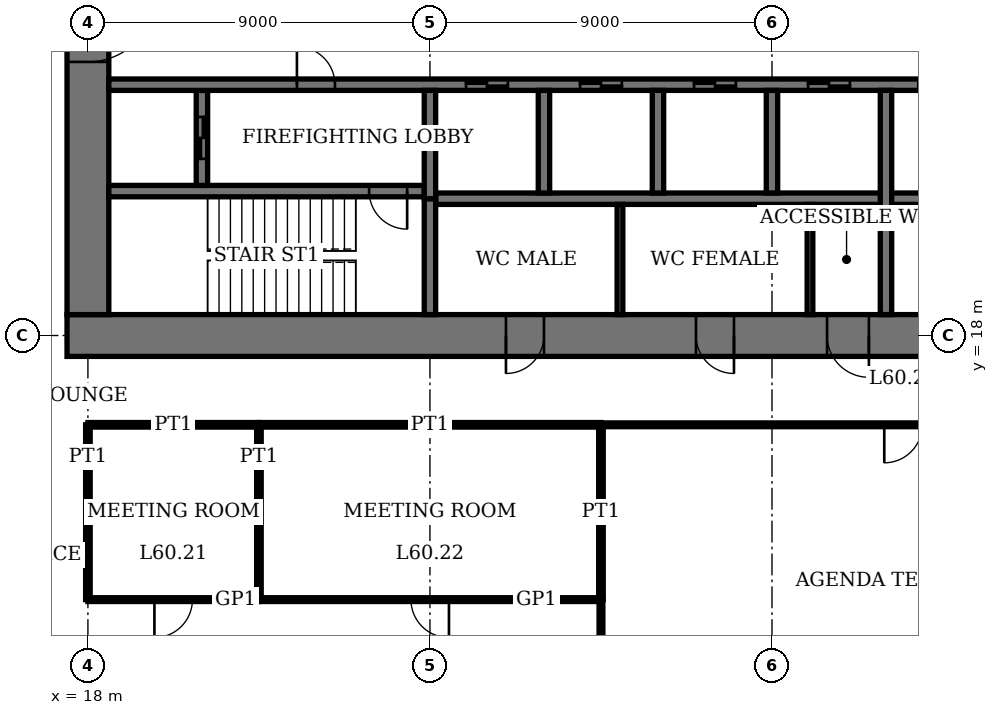
"""IFC4 building model, lengths in metres.
Left out: names, types, materials, properties, quantities, classifications, styles, units other than length and angle.
Written with IfcOpenShell. Run it as: python <this file> out.ifc"""

import sys

from ifc_helpers import new_model, si_unit, direction, frame, frame_2d, origin, place, context, subcontext, project, spatial, rectangle, extrude, element, fill, save


model = new_model("IFC4")
c1 = context("Model", 3, precision=1e-05, world=origin(), true_north=direction((0.0, 1.0)))
c2 = subcontext(c1, "Body", "Model", "MODEL_VIEW")
j1 = project(units=[si_unit("LENGTHUNIT", "METRE"), si_unit("PLANEANGLEUNIT", "RADIAN")], contexts=[c1])
p1 = place(None, origin())
s1 = spatial("IfcSite", under=j1, at=p1, CompositionType="ELEMENT")
p2 = place(p1, origin())
s2 = spatial("IfcBuilding", under=s1, at=p2, CompositionType="ELEMENT")
p3 = place(p2, frame((0.0, 0.0, 247.4)))
s3 = spatial("IfcBuildingStorey", under=s2, at=p3, CompositionType="ELEMENT", Elevation=247.4)
p4 = place(p3, frame((17.45, 18.0, 0.0), z_axis=(0.0, 0.0, 1.0), x_axis=(1.0, 0.0, 0.0)))
e1 = element("IfcWall", 1, at=p4, inside=s3, PredefinedType="SHEAR", context=c2, shape_type="SweptSolid", body=[
    extrude(rectangle(XDim=28.1, YDim=1.1, at=frame_2d((14.05, 0.0))), origin(), (0.0, 0.0, 1.0), 4.0),
])
p5 = place(p4, frame((11.55, 0.0, 0.0)))
e2 = element("IfcOpeningElement", 2, at=p5, cuts=e1, PredefinedType="OPENING", context=c2, shape_type="SweptSolid", body=[
    extrude(rectangle(XDim=1.0, YDim=2.4, at=frame_2d((0.5, 1.2))), frame((0.0, 0.56, 0.0), z_axis=(0.0, -1.0, 0.0), x_axis=(1.0, 0.0, 0.0)), (0.0, 0.0, 1.0), 1.12),
])
p6 = place(p4, frame((16.55, 0.0, 0.0)))
e3 = element("IfcOpeningElement", 3, at=p6, cuts=e1, PredefinedType="OPENING", context=c2, shape_type="SweptSolid", body=[
    extrude(rectangle(XDim=1.0, YDim=2.4, at=frame_2d((0.5, 1.2))), frame((0.0, 0.56, 0.0), z_axis=(0.0, -1.0, 0.0), x_axis=(1.0, 0.0, 0.0)), (0.0, 0.0, 1.0), 1.12),
])
p7 = place(p4, frame((20.0, 0.0, 0.0)))
e4 = element("IfcOpeningElement", 4, at=p7, cuts=e1, PredefinedType="OPENING", context=c2, shape_type="SweptSolid", body=[
    extrude(rectangle(XDim=1.1, YDim=2.4, at=frame_2d((0.55, 1.2))), frame((0.0, 0.56, 0.0), z_axis=(0.0, -1.0, 0.0), x_axis=(1.0, 0.0, 0.0)), (0.0, 0.0, 1.0), 1.12),
])
p8 = place(p4, frame((24.05, 0.0, 0.0)))
e5 = element("IfcOpeningElement", 5, at=p8, cuts=e1, PredefinedType="OPENING", context=c2, shape_type="SweptSolid", body=[
    extrude(rectangle(XDim=1.0, YDim=2.4, at=frame_2d((0.5, 1.2))), frame((0.0, 0.56, 0.0), z_axis=(0.0, -1.0, 0.0), x_axis=(1.0, 0.0, 0.0)), (0.0, 0.0, 1.0), 1.12),
])
p9 = place(p3, frame((18.0, 35.45, 0.0), z_axis=(0.0, 0.0, 1.0), x_axis=(0.0, -1.0, 0.0)))
e6 = element("IfcWall", 6, at=p9, inside=s3, PredefinedType="SHEAR", context=c2, shape_type="SweptSolid", body=[
    extrude(rectangle(XDim=16.9, YDim=1.1, at=frame_2d((8.45, 0.0))), origin(), (0.0, 0.0, 1.0), 4.0),
])
p10 = place(p9, frame((8.45, 0.0, 0.0)))
e7 = element("IfcOpeningElement", 7, at=p10, cuts=e6, PredefinedType="OPENING", context=c2, shape_type="SweptSolid", body=[
    extrude(rectangle(XDim=1.8, YDim=2.4, at=frame_2d((0.9, 1.2))), frame((0.0, 0.56, 0.0), z_axis=(0.0, -1.0, 0.0), x_axis=(1.0, 0.0, 0.0)), (0.0, 0.0, 1.0), 1.12),
])
p11 = place(p3, frame((18.55, 21.8, 0.0), z_axis=(0.0, 0.0, 1.0), x_axis=(1.0, 0.0, 0.0)))
e8 = element("IfcWall", 8, at=p11, inside=s3, PredefinedType="SHEAR", context=c2, shape_type="SweptSolid", body=[
    extrude(rectangle(XDim=8.3, YDim=0.3, at=frame_2d((4.15, 0.0))), origin(), (0.0, 0.0, 1.0), 4.0),
])
p12 = place(p11, frame((6.85, 0.0, 0.0)))
e9 = element("IfcOpeningElement", 9, at=p12, cuts=e8, PredefinedType="OPENING", context=c2, shape_type="SweptSolid", body=[
    extrude(rectangle(XDim=1.0, YDim=2.4, at=frame_2d((0.5, 1.2))), frame((0.0, 0.16, 0.0), z_axis=(0.0, -1.0, 0.0), x_axis=(1.0, 0.0, 0.0)), (0.0, 0.0, 1.0), 0.32),
])
p13 = place(p3, frame((27.0, 18.55, 0.0), z_axis=(0.0, 0.0, 1.0), x_axis=(0.0, 1.0, 0.0)))
e10 = element("IfcWall", 10, at=p13, inside=s3, PredefinedType="SHEAR", context=c2, shape_type="SweptSolid", body=[
    extrude(rectangle(XDim=3.05, YDim=0.3, at=frame_2d((1.525, 0.0))), origin(), (0.0, 0.0, 1.0), 4.0),
])
p14 = place(p3, frame((21.0, 21.95, 0.0), z_axis=(0.0, 0.0, 1.0), x_axis=(0.0, 1.0, 0.0)))
e11 = element("IfcWall", 11, at=p14, inside=s3, PredefinedType="SHEAR", context=c2, shape_type="SweptSolid", body=[
    extrude(rectangle(XDim=2.5, YDim=0.3, at=frame_2d((1.25, 0.0))), origin(), (0.0, 0.0, 1.0), 4.0),
])
p15 = place(p14, frame((0.7, 0.0, 0.0)))
e12 = element("IfcOpeningElement", 12, at=p15, cuts=e11, PredefinedType="OPENING", context=c2, shape_type="SweptSolid", body=[
    extrude(rectangle(XDim=1.1, YDim=2.4, at=frame_2d((0.55, 1.2))), frame((0.0, 0.16, 0.0), z_axis=(0.0, -1.0, 0.0), x_axis=(1.0, 0.0, 0.0)), (0.0, 0.0, 1.0), 0.32),
])
p16 = place(p3, frame((18.55, 24.6, 0.0), z_axis=(0.0, 0.0, 1.0), x_axis=(1.0, 0.0, 0.0)))
e13 = element("IfcWall", 13, at=p16, inside=s3, PredefinedType="SHEAR", context=c2, shape_type="SweptSolid", body=[
    extrude(rectangle(XDim=25.9, YDim=0.3, at=frame_2d((12.95, 0.0))), origin(), (0.0, 0.0, 1.0), 4.0),
])
p17 = place(p16, frame((4.95, 0.0, 0.0)))
e14 = element("IfcOpeningElement", 14, at=p17, cuts=e13, PredefinedType="OPENING", context=c2, shape_type="SweptSolid", body=[
    extrude(rectangle(XDim=1.0, YDim=2.4, at=frame_2d((0.5, 1.2))), frame((0.0, 0.16, 0.0), z_axis=(0.0, -1.0, 0.0), x_axis=(1.0, 0.0, 0.0)), (0.0, 0.0, 1.0), 0.32),
])
p18 = place(p16, frame((24.5, 0.0, 0.0)))
e15 = element("IfcOpeningElement", 15, at=p18, cuts=e13, PredefinedType="OPENING", context=c2, shape_type="SweptSolid", body=[
    extrude(rectangle(XDim=0.9, YDim=2.1, at=frame_2d((0.45, 1.05))), frame((0.0, 0.16, 0.0), z_axis=(0.0, -1.0, 0.0), x_axis=(1.0, 0.0, 0.0)), (0.0, 0.0, 1.0), 0.32),
])
p19 = place(p16, frame((9.4, 0.0, 0.0)))
e16 = element("IfcOpeningElement", 16, at=p19, cuts=e13, PredefinedType="OPENING", context=c2, shape_type="SweptSolid", body=[
    extrude(rectangle(XDim=1.1, YDim=2.4, at=frame_2d((0.55, 1.2))), frame((0.0, 0.16, 0.0), z_axis=(0.0, -1.0, 0.0), x_axis=(1.0, 0.0, 0.0)), (0.0, 0.0, 1.0), 0.32),
])
p20 = place(p16, frame((12.4, 0.0, 0.0)))
e17 = element("IfcOpeningElement", 17, at=p20, cuts=e13, PredefinedType="OPENING", context=c2, shape_type="SweptSolid", body=[
    extrude(rectangle(XDim=1.1, YDim=2.4, at=frame_2d((0.55, 1.2))), frame((0.0, 0.16, 0.0), z_axis=(0.0, -1.0, 0.0), x_axis=(1.0, 0.0, 0.0)), (0.0, 0.0, 1.0), 0.32),
])
p21 = place(p16, frame((15.4, 0.0, 0.0)))
e18 = element("IfcOpeningElement", 18, at=p21, cuts=e13, PredefinedType="OPENING", context=c2, shape_type="SweptSolid", body=[
    extrude(rectangle(XDim=1.1, YDim=2.4, at=frame_2d((0.55, 1.2))), frame((0.0, 0.16, 0.0), z_axis=(0.0, -1.0, 0.0), x_axis=(1.0, 0.0, 0.0)), (0.0, 0.0, 1.0), 0.32),
])
p22 = place(p16, frame((18.4, 0.0, 0.0)))
e19 = element("IfcOpeningElement", 19, at=p22, cuts=e13, PredefinedType="OPENING", context=c2, shape_type="SweptSolid", body=[
    extrude(rectangle(XDim=1.1, YDim=2.4, at=frame_2d((0.55, 1.2))), frame((0.0, 0.16, 0.0), z_axis=(0.0, -1.0, 0.0), x_axis=(1.0, 0.0, 0.0)), (0.0, 0.0, 1.0), 0.32),
])
p23 = place(p16, frame((21.3, 0.0, 0.0)))
e20 = element("IfcOpeningElement", 20, at=p23, cuts=e13, PredefinedType="OPENING", context=c2, shape_type="SweptSolid", body=[
    extrude(rectangle(XDim=1.3, YDim=2.4, at=frame_2d((0.65, 1.2))), frame((0.0, 0.16, 0.0), z_axis=(0.0, -1.0, 0.0), x_axis=(1.0, 0.0, 0.0)), (0.0, 0.0, 1.0), 0.32),
])
p24 = place(p3, frame((27.15, 21.6, 0.0), z_axis=(0.0, 0.0, 1.0), x_axis=(1.0, 0.0, 0.0)))
e21 = element("IfcWall", 21, at=p24, inside=s3, PredefinedType="SHEAR", context=c2, shape_type="SweptSolid", body=[
    extrude(rectangle(XDim=17.3, YDim=0.3, at=frame_2d((8.65, 0.0))), origin(), (0.0, 0.0, 1.0), 4.0),
])
for number, where, z_axis, x_axis in (
    (22, (30.0, 21.75, 0.0), (0.0, 0.0, 1.0), (0.0, 1.0, 0.0)),
    (23, (33.0, 21.75, 0.0), (0.0, 0.0, 1.0), (0.0, 1.0, 0.0)),
    (24, (36.0, 21.75, 0.0), (0.0, 0.0, 1.0), (0.0, 1.0, 0.0)),
):
    element("IfcWall", number, at=place(p3, frame(where, z_axis=z_axis, x_axis=x_axis)), inside=s3, PredefinedType="SHEAR", context=c2, shape_type="SweptSolid", body=[
        extrude(rectangle(XDim=2.7, YDim=0.3, at=frame_2d((1.35, 0.0))), origin(), (0.0, 0.0, 1.0), 4.0),
    ])
p25 = place(p3, frame((39.0, 18.55, 0.0), z_axis=(0.0, 0.0, 1.0), x_axis=(0.0, 1.0, 0.0)))
e25 = element("IfcWall", 25, at=p25, inside=s3, PredefinedType="SHEAR", context=c2, shape_type="SweptSolid", body=[
    extrude(rectangle(XDim=5.9, YDim=0.3, at=frame_2d((2.95, 0.0))), origin(), (0.0, 0.0, 1.0), 4.0),
])
p26 = place(p3, frame((27.0, 21.6, 0.0), z_axis=(0.0, 0.0, 1.0), x_axis=(0.0, 1.0, 0.0)))
e26 = element("IfcWall", 26, at=p26, inside=s3, PredefinedType="SHEAR", context=c2, shape_type="SweptSolid", body=[
    extrude(rectangle(XDim=2.85, YDim=0.3, at=frame_2d((1.425, 0.0))), origin(), (0.0, 0.0, 1.0), 4.0),
])
p27 = place(p3, frame((18.0, 11.05, 0.0), z_axis=(0.0, 0.0, 1.0), x_axis=(1.0, 0.0, 0.0)))
e27 = element("IfcWall", 27, at=p27, inside=s3, PredefinedType="PARTITIONING", context=c2, shape_type="SweptSolid", body=[
    extrude(rectangle(XDim=4.5, YDim=0.1, at=frame_2d((2.25, 0.0))), origin(), (0.0, 0.0, 1.0), 3.75),
])
p28 = place(p27, frame((1.75, 0.0, 0.0)))
e28 = element("IfcOpeningElement", 28, at=p28, cuts=e27, PredefinedType="OPENING", context=c2, shape_type="SweptSolid", body=[
    extrude(rectangle(XDim=1.0, YDim=2.4, at=frame_2d((0.5, 1.2))), frame((0.0, 0.06, 0.0), z_axis=(0.0, -1.0, 0.0), x_axis=(1.0, 0.0, 0.0)), (0.0, 0.0, 1.0), 0.12),
])
p29 = place(p3, frame((22.5, 11.05, 0.0), z_axis=(0.0, 0.0, 1.0), x_axis=(1.0, 0.0, 0.0)))
e29 = element("IfcWall", 29, at=p29, inside=s3, PredefinedType="PARTITIONING", context=c2, shape_type="SweptSolid", body=[
    extrude(rectangle(XDim=9.0, YDim=0.1, at=frame_2d((4.5, 0.0))), origin(), (0.0, 0.0, 1.0), 3.75),
])
p30 = place(p29, frame((4.0, 0.0, 0.0)))
e30 = element("IfcOpeningElement", 30, at=p30, cuts=e29, PredefinedType="OPENING", context=c2, shape_type="SweptSolid", body=[
    extrude(rectangle(XDim=1.0, YDim=2.4, at=frame_2d((0.5, 1.2))), frame((0.0, 0.06, 0.0), z_axis=(0.0, -1.0, 0.0), x_axis=(1.0, 0.0, 0.0)), (0.0, 0.0, 1.0), 0.12),
])
p31 = place(p3, frame((18.0, 15.65, 0.0), z_axis=(0.0, 0.0, 1.0), x_axis=(1.0, 0.0, 0.0)))
e31 = element("IfcWall", 31, at=p31, inside=s3, PredefinedType="PARTITIONING", context=c2, shape_type="SweptSolid", body=[
    extrude(rectangle(XDim=4.5, YDim=0.12, at=frame_2d((2.25, 0.0))), origin(), (0.0, 0.0, 1.0), 3.75),
])
p32 = place(p3, frame((22.5, 15.65, 0.0), z_axis=(0.0, 0.0, 1.0), x_axis=(1.0, 0.0, 0.0)))
e32 = element("IfcWall", 32, at=p32, inside=s3, PredefinedType="PARTITIONING", context=c2, shape_type="SweptSolid", body=[
    extrude(rectangle(XDim=9.0, YDim=0.12, at=frame_2d((4.5, 0.0))), origin(), (0.0, 0.0, 1.0), 3.75),
])
p33 = place(p3, frame((31.51, 15.65, 0.0), z_axis=(0.0, 0.0, 1.0), x_axis=(1.0, 0.0, 0.0)))
e33 = element("IfcWall", 33, at=p33, inside=s3, PredefinedType="PARTITIONING", context=c2, shape_type="SweptSolid", body=[
    extrude(rectangle(XDim=15.89, YDim=0.1, at=frame_2d((7.945, 0.0))), origin(), (0.0, 0.0, 1.0), 3.75),
])
p34 = place(p33, frame((7.445, 0.0, 0.0)))
e34 = element("IfcOpeningElement", 34, at=p34, cuts=e33, PredefinedType="OPENING", context=c2, shape_type="SweptSolid", body=[
    extrude(rectangle(XDim=1.0, YDim=2.4, at=frame_2d((0.5, 1.2))), frame((0.0, 0.06, 0.0), z_axis=(0.0, -1.0, 0.0), x_axis=(1.0, 0.0, 0.0)), (0.0, 0.0, 1.0), 0.12),
])
p35 = place(p3, frame((18.0, 11.05, 0.0), z_axis=(0.0, 0.0, 1.0), x_axis=(0.0, 1.0, 0.0)))
e35 = element("IfcWall", 35, at=p35, inside=s3, PredefinedType="PARTITIONING", context=c2, shape_type="SweptSolid", body=[
    extrude(rectangle(XDim=4.6, YDim=0.12, at=frame_2d((2.3, 0.0))), origin(), (0.0, 0.0, 1.0), 3.05),
])
for number, where, z_axis, x_axis in (
    (36, (22.5, 11.05, 0.0), (0.0, 0.0, 1.0), (0.0, 1.0, 0.0)),
    (37, (31.5, 11.05, 0.0), (0.0, 0.0, 1.0), (0.0, 1.0, 0.0)),
):
    element("IfcWall", number, at=place(p3, frame(where, z_axis=z_axis, x_axis=x_axis)), inside=s3, PredefinedType="PARTITIONING", context=c2, shape_type="SweptSolid", body=[
        extrude(rectangle(XDim=4.6, YDim=0.12, at=frame_2d((2.3, 0.0))), origin(), (0.0, 0.0, 1.0), 3.75),
    ])
p36 = place(p3, frame((31.5, 7.19, 0.0), z_axis=(0.0, 0.0, 1.0), x_axis=(0.0, 1.0, 0.0)))
e38 = element("IfcWall", 38, at=p36, inside=s3, PredefinedType="PARTITIONING", context=c2, shape_type="SweptSolid", body=[
    extrude(rectangle(XDim=3.86, YDim=0.1, at=frame_2d((1.93, 0.0))), origin(), (0.0, 0.0, 1.0), 3.75),
])
for number, where, z_axis, x_axis in (
    (39, (32.0, 18.55, 0.0), (0.0, 0.0, 1.0), (0.0, 1.0, 0.0)),
    (40, (37.0, 18.55, 0.0), (0.0, 0.0, 1.0), (0.0, 1.0, 0.0)),
):
    element("IfcWall", number, at=place(p3, frame(where, z_axis=z_axis, x_axis=x_axis)), inside=s3, PredefinedType="PARTITIONING", context=c2, shape_type="SweptSolid", body=[
        extrude(rectangle(XDim=2.9, YDim=0.15, at=frame_2d((1.45, 0.0))), origin(), (0.0, 0.0, 1.0), 3.75),
    ])
p37 = place(p10, origin())
e41 = element("IfcDoor", 41, at=p37, inside=s3, OperationType="DOUBLE_DOOR_DOUBLE_SWING", PredefinedType="DOOR", context=c2, shape_type="SweptSolid", body=[
    extrude(rectangle(XDim=1.8, YDim=2.4, at=frame_2d((0.9, 1.2))), frame((0.0, 0.03, 0.0), z_axis=(0.0, -1.0, 0.0), x_axis=(1.0, 0.0, 0.0)), (0.0, 0.0, 1.0), 0.06),
    extrude(rectangle(XDim=0.04, YDim=2.4, at=frame_2d((0.02, 1.2))), frame((0.0, 0.55, 0.0), z_axis=(0.0, -1.0, 0.0), x_axis=(1.0, 0.0, 0.0)), (0.0, 0.0, 1.0), 1.1),
    extrude(rectangle(XDim=0.04, YDim=2.4, at=frame_2d((1.78, 1.2))), frame((0.0, 0.55, 0.0), z_axis=(0.0, -1.0, 0.0), x_axis=(1.0, 0.0, 0.0)), (0.0, 0.0, 1.0), 1.1),
    extrude(rectangle(XDim=1.8, YDim=0.04, at=frame_2d((0.9, 2.38))), frame((0.0, 0.55, 0.0), z_axis=(0.0, -1.0, 0.0), x_axis=(1.0, 0.0, 0.0)), (0.0, 0.0, 1.0), 1.1),
])
fill(e7, e41)
p38 = place(p5, origin())
e42 = element("IfcDoor", 42, at=p38, inside=s3, OperationType="SINGLE_SWING_LEFT", PredefinedType="DOOR", context=c2, shape_type="SweptSolid", body=[
    extrude(rectangle(XDim=1.0, YDim=2.4, at=frame_2d((0.5, 1.2))), frame((0.0, 0.025, 0.0), z_axis=(0.0, -1.0, 0.0), x_axis=(1.0, 0.0, 0.0)), (0.0, 0.0, 1.0), 0.05),
    extrude(rectangle(XDim=0.04, YDim=2.4, at=frame_2d((0.02, 1.2))), frame((0.0, 0.4, 0.0), z_axis=(0.0, -1.0, 0.0), x_axis=(1.0, 0.0, 0.0)), (0.0, 0.0, 1.0), 0.8),
    extrude(rectangle(XDim=0.04, YDim=2.4, at=frame_2d((0.98, 1.2))), frame((0.0, 0.4, 0.0), z_axis=(0.0, -1.0, 0.0), x_axis=(1.0, 0.0, 0.0)), (0.0, 0.0, 1.0), 0.8),
    extrude(rectangle(XDim=1.0, YDim=0.04, at=frame_2d((0.5, 2.38))), frame((0.0, 0.4, 0.0), z_axis=(0.0, -1.0, 0.0), x_axis=(1.0, 0.0, 0.0)), (0.0, 0.0, 1.0), 0.8),
])
fill(e2, e42)
p39 = place(p6, origin())
e43 = element("IfcDoor", 43, at=p39, inside=s3, OperationType="SINGLE_SWING_RIGHT", PredefinedType="DOOR", context=c2, shape_type="SweptSolid", body=[
    extrude(rectangle(XDim=1.0, YDim=2.4, at=frame_2d((0.5, 1.2))), frame((0.0, 0.025, 0.0), z_axis=(0.0, -1.0, 0.0), x_axis=(1.0, 0.0, 0.0)), (0.0, 0.0, 1.0), 0.05),
    extrude(rectangle(XDim=0.04, YDim=2.4, at=frame_2d((0.02, 1.2))), frame((0.0, 0.4, 0.0), z_axis=(0.0, -1.0, 0.0), x_axis=(1.0, 0.0, 0.0)), (0.0, 0.0, 1.0), 0.8),
    extrude(rectangle(XDim=0.04, YDim=2.4, at=frame_2d((0.98, 1.2))), frame((0.0, 0.4, 0.0), z_axis=(0.0, -1.0, 0.0), x_axis=(1.0, 0.0, 0.0)), (0.0, 0.0, 1.0), 0.8),
    extrude(rectangle(XDim=1.0, YDim=0.04, at=frame_2d((0.5, 2.38))), frame((0.0, 0.4, 0.0), z_axis=(0.0, -1.0, 0.0), x_axis=(1.0, 0.0, 0.0)), (0.0, 0.0, 1.0), 0.8),
])
fill(e3, e43)
p40 = place(p7, origin())
e44 = element("IfcDoor", 44, at=p40, inside=s3, OperationType="SINGLE_SWING_RIGHT", PredefinedType="DOOR", context=c2, shape_type="SweptSolid", body=[
    extrude(rectangle(XDim=1.1, YDim=2.4, at=frame_2d((0.55, 1.2))), frame((0.0, 0.025, 0.0), z_axis=(0.0, -1.0, 0.0), x_axis=(1.0, 0.0, 0.0)), (0.0, 0.0, 1.0), 0.05),
    extrude(rectangle(XDim=0.04, YDim=2.4, at=frame_2d((0.02, 1.2))), frame((0.0, 0.44, 0.0), z_axis=(0.0, -1.0, 0.0), x_axis=(1.0, 0.0, 0.0)), (0.0, 0.0, 1.0), 0.88),
    extrude(rectangle(XDim=0.04, YDim=2.4, at=frame_2d((1.08, 1.2))), frame((0.0, 0.44, 0.0), z_axis=(0.0, -1.0, 0.0), x_axis=(1.0, 0.0, 0.0)), (0.0, 0.0, 1.0), 0.88),
    extrude(rectangle(XDim=1.1, YDim=0.04, at=frame_2d((0.55, 2.38))), frame((0.0, 0.44, 0.0), z_axis=(0.0, -1.0, 0.0), x_axis=(1.0, 0.0, 0.0)), (0.0, 0.0, 1.0), 0.88),
])
fill(e4, e44)
p41 = place(p12, origin())
e45 = element("IfcDoor", 45, at=p41, inside=s3, OperationType="SINGLE_SWING_RIGHT", PredefinedType="DOOR", context=c2, shape_type="SweptSolid", body=[
    extrude(rectangle(XDim=1.0, YDim=2.4, at=frame_2d((0.5, 1.2))), frame((0.0, 0.03, 0.0), z_axis=(0.0, -1.0, 0.0), x_axis=(1.0, 0.0, 0.0)), (0.0, 0.0, 1.0), 0.06),
])
fill(e9, e45)
p42 = place(p17, origin())
e46 = element("IfcDoor", 46, at=p42, inside=s3, OperationType="SINGLE_SWING_RIGHT", PredefinedType="DOOR", context=c2, shape_type="SweptSolid", body=[
    extrude(rectangle(XDim=1.0, YDim=2.4, at=frame_2d((0.5, 1.2))), frame((0.0, 0.03, 0.0), z_axis=(0.0, -1.0, 0.0), x_axis=(1.0, 0.0, 0.0)), (0.0, 0.0, 1.0), 0.06),
])
fill(e14, e46)
p43 = place(p28, origin())
e47 = element("IfcDoor", 47, at=p43, inside=s3, OperationType="SINGLE_SWING_LEFT", PredefinedType="DOOR", context=c2, shape_type="SweptSolid", body=[
    extrude(rectangle(XDim=1.0, YDim=2.4, at=frame_2d((0.5, 1.2))), frame((0.0, 0.02, 0.0), z_axis=(0.0, -1.0, 0.0), x_axis=(1.0, 0.0, 0.0)), (0.0, 0.0, 1.0), 0.04),
])
fill(e28, e47)
p44 = place(p30, origin())
e48 = element("IfcDoor", 48, at=p44, inside=s3, OperationType="SINGLE_SWING_RIGHT", PredefinedType="DOOR", context=c2, shape_type="SweptSolid", body=[
    extrude(rectangle(XDim=1.0, YDim=2.4, at=frame_2d((0.5, 1.2))), frame((0.0, 0.02, 0.0), z_axis=(0.0, -1.0, 0.0), x_axis=(1.0, 0.0, 0.0)), (0.0, 0.0, 1.0), 0.04),
])
fill(e30, e48)
p45 = place(p34, origin())
e49 = element("IfcDoor", 49, at=p45, inside=s3, OperationType="SINGLE_SWING_LEFT", PredefinedType="DOOR", context=c2, shape_type="SweptSolid", body=[
    extrude(rectangle(XDim=1.0, YDim=2.4, at=frame_2d((0.5, 1.2))), frame((0.0, 0.02, 0.0), z_axis=(0.0, -1.0, 0.0), x_axis=(1.0, 0.0, 0.0)), (0.0, 0.0, 1.0), 0.04),
])
fill(e34, e49)
p46 = place(p19, origin())
e50 = element("IfcDoor", 50, at=p46, inside=s3, OperationType="DOUBLE_DOOR_SLIDING", PredefinedType="DOOR", context=c2, shape_type="SweptSolid", body=[
    extrude(rectangle(XDim=1.1, YDim=2.4, at=frame_2d((0.55, 1.2))), frame((0.0, 0.02, 0.0), z_axis=(0.0, -1.0, 0.0), x_axis=(1.0, 0.0, 0.0)), (0.0, 0.0, 1.0), 0.04),
])
fill(e16, e50)
p47 = place(p20, origin())
e51 = element("IfcDoor", 51, at=p47, inside=s3, OperationType="DOUBLE_DOOR_SLIDING", PredefinedType="DOOR", context=c2, shape_type="SweptSolid", body=[
    extrude(rectangle(XDim=1.1, YDim=2.4, at=frame_2d((0.55, 1.2))), frame((0.0, 0.02, 0.0), z_axis=(0.0, -1.0, 0.0), x_axis=(1.0, 0.0, 0.0)), (0.0, 0.0, 1.0), 0.04),
])
fill(e17, e51)
p48 = place(p21, origin())
e52 = element("IfcDoor", 52, at=p48, inside=s3, OperationType="DOUBLE_DOOR_SLIDING", PredefinedType="DOOR", context=c2, shape_type="SweptSolid", body=[
    extrude(rectangle(XDim=1.1, YDim=2.4, at=frame_2d((0.55, 1.2))), frame((0.0, 0.02, 0.0), z_axis=(0.0, -1.0, 0.0), x_axis=(1.0, 0.0, 0.0)), (0.0, 0.0, 1.0), 0.04),
])
fill(e18, e52)
p49 = place(p22, origin())
e53 = element("IfcDoor", 53, at=p49, inside=s3, OperationType="DOUBLE_DOOR_SLIDING", PredefinedType="DOOR", context=c2, shape_type="SweptSolid", body=[
    extrude(rectangle(XDim=1.1, YDim=2.4, at=frame_2d((0.55, 1.2))), frame((0.0, 0.02, 0.0), z_axis=(0.0, -1.0, 0.0), x_axis=(1.0, 0.0, 0.0)), (0.0, 0.0, 1.0), 0.04),
])
fill(e19, e53)
p50 = place(p23, origin())
e54 = element("IfcDoor", 54, at=p50, inside=s3, OperationType="DOUBLE_DOOR_SLIDING", PredefinedType="DOOR", context=c2, shape_type="SweptSolid", body=[
    extrude(rectangle(XDim=1.3, YDim=2.4, at=frame_2d((0.65, 1.2))), frame((0.0, 0.02, 0.0), z_axis=(0.0, -1.0, 0.0), x_axis=(1.0, 0.0, 0.0)), (0.0, 0.0, 1.0), 0.04),
])
fill(e20, e54)
p51 = place(p15, origin())
e55 = element("IfcDoor", 55, at=p51, inside=s3, OperationType="DOUBLE_DOOR_SLIDING", PredefinedType="DOOR", context=c2, shape_type="SweptSolid", body=[
    extrude(rectangle(XDim=1.1, YDim=2.4, at=frame_2d((0.55, 1.2))), frame((0.0, 0.03, 0.0), z_axis=(0.0, -1.0, 0.0), x_axis=(1.0, 0.0, 0.0)), (0.0, 0.0, 1.0), 0.06),
])
fill(e12, e55)
save(model, sys.argv[1])
